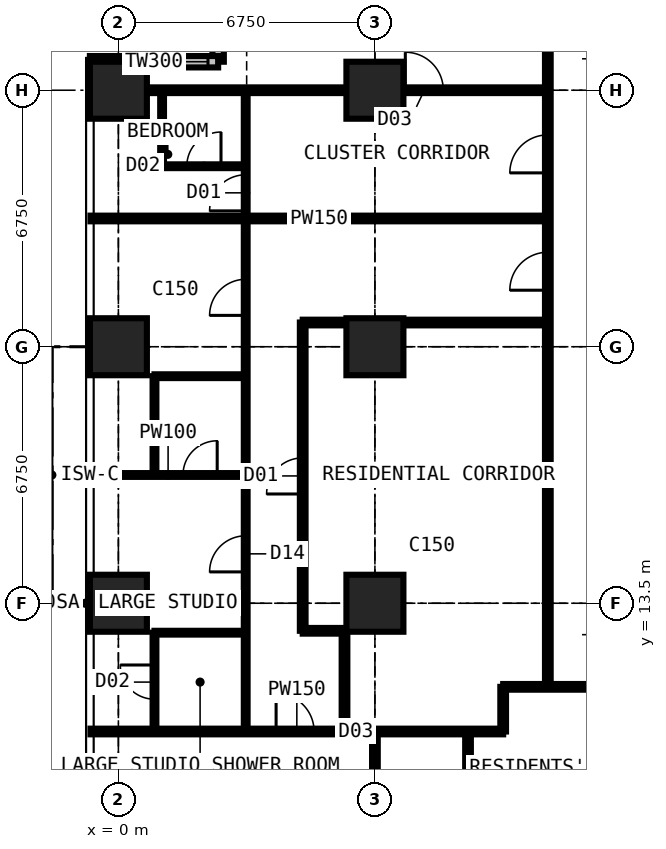
"""IFC4 building model, lengths in metres.
Left out: names, types, materials, properties, quantities, classifications, styles, units other than length and angle.
Written with IfcOpenShell. Run it as: python <this file> out.ifc"""

import sys

from ifc_helpers import new_model, si_unit, direction, frame, frame_2d, origin, origin_2d, place, context, subcontext, project, spatial, rectangle, extrude, element, fill, save


model = new_model("IFC4")
c1 = context("Model", 3, precision=1e-05, world=origin(), true_north=direction((0.0, 1.0)))
c2 = subcontext(c1, "Body", "Model", "MODEL_VIEW")
j1 = project(units=[si_unit("LENGTHUNIT", "METRE"), si_unit("PLANEANGLEUNIT", "RADIAN")], contexts=[c1])
p1 = place(None, origin())
s1 = spatial("IfcSite", under=j1, at=p1, CompositionType="ELEMENT")
p2 = place(p1, origin())
s2 = spatial("IfcBuilding", under=s1, at=p2, CompositionType="ELEMENT")
p3 = place(p2, frame((0.0, 0.0, 153.0)))
s3 = spatial("IfcBuildingStorey", under=s2, at=p3, CompositionType="ELEMENT", Elevation=153.0)
for number, where, z_axis, x_axis in (
    (1, (0.0, 13.5, 0.0), (0.0, 0.0, 1.0), (1.0, 0.0, 0.0)),
    (2, (0.0, 20.25, 0.0), (0.0, 0.0, 1.0), (1.0, 0.0, 0.0)),
    (3, (0.0, 27.0, 0.0), (0.0, 0.0, 1.0), (1.0, 0.0, 0.0)),
    (4, (6.75, 13.5, 0.0), (0.0, 0.0, 1.0), (1.0, 0.0, 0.0)),
    (5, (6.75, 20.25, 0.0), (0.0, 0.0, 1.0), (1.0, 0.0, 0.0)),
    (6, (6.75, 27.0, 0.0), (0.0, 0.0, 1.0), (1.0, 0.0, 0.0)),
):
    element("IfcColumn", number, at=place(p3, frame(where, z_axis=z_axis, x_axis=x_axis)), inside=s3, PredefinedType="COLUMN", context=c2, shape_type="SweptSolid", body=[
        extrude(rectangle(XDim=1.5, YDim=1.5, at=origin_2d()), origin(), (0.0, 0.0, 1.0), 3.6),
    ])
p4 = place(p3, frame((2.625, 31.125, 0.0), z_axis=(0.0, 0.0, 1.0), x_axis=(0.0, -1.0, 0.0)))
e7 = element("IfcWall", 7, at=p4, inside=s3, PredefinedType="SOLIDWALL", context=c2, shape_type="SweptSolid", body=[
    extrude(rectangle(XDim=3.375, YDim=0.3, at=frame_2d((1.688, 0.0))), origin(), (0.0, 0.0, 1.0), 3.375),
])
p5 = place(p4, frame((0.788, 0.0, 0.6)))
e8 = element("IfcOpeningElement", 8, at=p5, cuts=e7, PredefinedType="OPENING", context=c2, shape_type="SweptSolid", body=[
    extrude(rectangle(XDim=1.8, YDim=2.1, at=frame_2d((0.9, 1.05))), frame((0.0, 0.16, 0.0), z_axis=(0.0, -1.0, 0.0), x_axis=(1.0, 0.0, 0.0)), (0.0, 0.0, 1.0), 0.32),
])
p6 = place(p3, frame((2.625, 27.75, 0.0), z_axis=(0.0, 0.0, 1.0), x_axis=(-1.0, 0.0, 0.0)))
e9 = element("IfcWall", 9, at=p6, inside=s3, PredefinedType="SOLIDWALL", context=c2, shape_type="SweptSolid", body=[
    extrude(rectangle(XDim=3.375, YDim=0.3, at=frame_2d((1.688, 0.0))), origin(), (0.0, 0.0, 1.0), 3.375),
])
p7 = place(p6, frame((0.268, 0.0, 0.9)))
e10 = element("IfcOpeningElement", 10, at=p7, cuts=e9, PredefinedType="OPENING", context=c2, shape_type="SweptSolid", body=[
    extrude(rectangle(XDim=1.5, YDim=1.8, at=frame_2d((0.75, 0.9))), frame((0.0, 0.16, 0.0), z_axis=(0.0, -1.0, 0.0), x_axis=(1.0, 0.0, 0.0)), (0.0, 0.0, 1.0), 0.32),
])
p8 = place(p3, frame((-0.734, 10.125, 0.0), z_axis=(0.0, 0.0, 1.0), x_axis=(1.0, 0.0, 0.0)))
e11 = element("IfcWall", 11, at=p8, inside=s3, PredefinedType="PARTITIONING", context=c2, shape_type="SweptSolid", body=[
    extrude(rectangle(XDim=10.859, YDim=0.15, at=frame_2d((5.429, 0.0))), origin(), (0.0, 0.0, 1.0), 3.375),
])
p9 = place(p8, frame((4.884, 0.0, 0.0)))
e12 = element("IfcOpeningElement", 12, at=p9, cuts=e11, PredefinedType="OPENING", context=c2, shape_type="SweptSolid", body=[
    extrude(rectangle(XDim=1.0, YDim=2.2, at=frame_2d((0.5, 1.1))), frame((0.0, 0.085, 0.0), z_axis=(0.0, -1.0, 0.0), x_axis=(1.0, 0.0, 0.0)), (0.0, 0.0, 1.0), 0.17),
])
p10 = place(p3, frame((-0.734, 16.875, 0.0), z_axis=(0.0, 0.0, 1.0), x_axis=(1.0, 0.0, 0.0)))
e13 = element("IfcWall", 13, at=p10, inside=s3, PredefinedType="PARTITIONING", context=c2, shape_type="SweptSolid", body=[
    extrude(rectangle(XDim=4.084, YDim=0.1, at=frame_2d((2.042, 0.0))), origin(), (0.0, 0.0, 1.0), 3.375),
])
p11 = place(p10, frame((2.434, 0.0, 0.0)))
e14 = element("IfcOpeningElement", 14, at=p11, cuts=e13, PredefinedType="OPENING", context=c2, shape_type="SweptSolid", body=[
    extrude(rectangle(XDim=0.9, YDim=2.2, at=frame_2d((0.45, 1.1))), frame((0.0, 0.06, 0.0), z_axis=(0.0, -1.0, 0.0), x_axis=(1.0, 0.0, 0.0)), (0.0, 0.0, 1.0), 0.12),
])
p12 = place(p3, frame((-0.734, 23.625, 0.0), z_axis=(0.0, 0.0, 1.0), x_axis=(1.0, 0.0, 0.0)))
e15 = element("IfcWall", 15, at=p12, inside=s3, PredefinedType="PARTITIONING", context=c2, shape_type="SweptSolid", body=[
    extrude(rectangle(XDim=12.034, YDim=0.15, at=frame_2d((6.017, 0.0))), origin(), (0.0, 0.0, 1.0), 3.375),
])
p13 = place(p3, frame((-0.734, 27.0, 0.0), z_axis=(0.0, 0.0, 1.0), x_axis=(1.0, 0.0, 0.0)))
e16 = element("IfcWall", 16, at=p13, inside=s3, PredefinedType="PARTITIONING", context=c2, shape_type="SweptSolid", body=[
    extrude(rectangle(XDim=12.034, YDim=0.15, at=frame_2d((6.017, 0.0))), origin(), (0.0, 0.0, 1.0), 2.806),
])
p14 = place(p13, frame((8.284, 0.0, 0.0)))
e17 = element("IfcOpeningElement", 17, at=p14, cuts=e16, PredefinedType="OPENING", context=c2, shape_type="SweptSolid", body=[
    extrude(rectangle(XDim=1.0, YDim=2.2, at=frame_2d((0.5, 1.1))), frame((0.0, 0.085, 0.0), z_axis=(0.0, -1.0, 0.0), x_axis=(1.0, 0.0, 0.0)), (0.0, 0.0, 1.0), 0.17),
])
p15 = place(p3, frame((0.95, 10.125, 0.0), z_axis=(0.0, 0.0, 1.0), x_axis=(0.0, 1.0, 0.0)))
e18 = element("IfcWall", 18, at=p15, inside=s3, PredefinedType="PARTITIONING", context=c2, shape_type="SweptSolid", body=[
    extrude(rectangle(XDim=2.6, YDim=0.1, at=frame_2d((1.3, 0.0))), origin(), (0.0, 0.0, 1.0), 3.375),
])
p16 = place(p15, frame((0.85, 0.0, 0.0)))
e19 = element("IfcOpeningElement", 19, at=p16, cuts=e18, PredefinedType="OPENING", context=c2, shape_type="SweptSolid", body=[
    extrude(rectangle(XDim=0.9, YDim=2.2, at=frame_2d((0.45, 1.1))), frame((0.0, 0.06, 0.0), z_axis=(0.0, -1.0, 0.0), x_axis=(1.0, 0.0, 0.0)), (0.0, 0.0, 1.0), 0.12),
])
p17 = place(p3, frame((0.95, 12.725, 0.0), z_axis=(0.0, 0.0, 1.0), x_axis=(1.0, 0.0, 0.0)))
e20 = element("IfcWall", 20, at=p17, inside=s3, PredefinedType="PARTITIONING", context=c2, shape_type="SweptSolid", body=[
    extrude(rectangle(XDim=2.4, YDim=0.1, at=frame_2d((1.2, 0.0))), origin(), (0.0, 0.0, 1.0), 3.375),
])
p18 = place(p3, frame((0.95, 16.875, 0.0), z_axis=(0.0, 0.0, 1.0), x_axis=(0.0, 1.0, 0.0)))
e21 = element("IfcWall", 21, at=p18, inside=s3, PredefinedType="PARTITIONING", context=c2, shape_type="SweptSolid", body=[
    extrude(rectangle(XDim=2.6, YDim=0.1, at=frame_2d((1.3, 0.0))), origin(), (0.0, 0.0, 1.0), 3.375),
])
p19 = place(p3, frame((0.95, 19.475, 0.0), z_axis=(0.0, 0.0, 1.0), x_axis=(1.0, 0.0, 0.0)))
e22 = element("IfcWall", 22, at=p19, inside=s3, PredefinedType="PARTITIONING", context=c2, shape_type="SweptSolid", body=[
    extrude(rectangle(XDim=2.4, YDim=0.1, at=frame_2d((1.2, 0.0))), origin(), (0.0, 0.0, 1.0), 3.375),
])
p20 = place(p3, frame((1.15, 25.0, 0.0), z_axis=(0.0, 0.0, 1.0), x_axis=(0.0, 1.0, 0.0)))
e23 = element("IfcWall", 23, at=p20, inside=s3, PredefinedType="PARTITIONING", context=c2, shape_type="SweptSolid", body=[
    extrude(rectangle(XDim=2.0, YDim=0.1, at=frame_2d((1.0, 0.0))), origin(), (0.0, 0.0, 1.0), 3.375),
])
p21 = place(p3, frame((1.15, 25.0, 0.0), z_axis=(0.0, 0.0, 1.0), x_axis=(1.0, 0.0, 0.0)))
e24 = element("IfcWall", 24, at=p21, inside=s3, PredefinedType="PARTITIONING", context=c2, shape_type="SweptSolid", body=[
    extrude(rectangle(XDim=2.2, YDim=0.1, at=frame_2d((1.1, 0.0))), origin(), (0.0, 0.0, 1.0), 3.375),
])
p22 = place(p21, frame((0.65, 0.0, 0.0)))
e25 = element("IfcOpeningElement", 25, at=p22, cuts=e24, PredefinedType="OPENING", context=c2, shape_type="SweptSolid", body=[
    extrude(rectangle(XDim=0.9, YDim=2.2, at=frame_2d((0.45, 1.1))), frame((0.0, 0.06, 0.0), z_axis=(0.0, -1.0, 0.0), x_axis=(1.0, 0.0, 0.0)), (0.0, 0.0, 1.0), 0.12),
])
p23 = place(p3, frame((3.35, 10.125, 0.0), z_axis=(0.0, 0.0, 1.0), x_axis=(0.0, 1.0, 0.0)))
e26 = element("IfcWall", 26, at=p23, inside=s3, PredefinedType="PARTITIONING", context=c2, shape_type="SweptSolid", body=[
    extrude(rectangle(XDim=16.875, YDim=0.1, at=frame_2d((8.438, 0.0))), origin(), (0.0, 0.0, 1.0), 3.375),
])
p24 = place(p23, frame((13.7, 0.0, 0.0)))
e27 = element("IfcOpeningElement", 27, at=p24, cuts=e26, PredefinedType="OPENING", context=c2, shape_type="SweptSolid", body=[
    extrude(rectangle(XDim=0.95, YDim=2.2, at=frame_2d((0.475, 1.1))), frame((0.0, 0.06, 0.0), z_axis=(0.0, -1.0, 0.0), x_axis=(1.0, 0.0, 0.0)), (0.0, 0.0, 1.0), 0.12),
])
p25 = place(p23, frame((4.2, 0.0, 0.0)))
e28 = element("IfcOpeningElement", 28, at=p25, cuts=e26, PredefinedType="OPENING", context=c2, shape_type="SweptSolid", body=[
    extrude(rectangle(XDim=0.95, YDim=2.2, at=frame_2d((0.475, 1.1))), frame((0.0, 0.06, 0.0), z_axis=(0.0, -1.0, 0.0), x_axis=(1.0, 0.0, 0.0)), (0.0, 0.0, 1.0), 0.12),
])
p26 = place(p23, frame((10.95, 0.0, 0.0)))
e29 = element("IfcOpeningElement", 29, at=p26, cuts=e26, PredefinedType="OPENING", context=c2, shape_type="SweptSolid", body=[
    extrude(rectangle(XDim=0.95, YDim=2.2, at=frame_2d((0.475, 1.1))), frame((0.0, 0.06, 0.0), z_axis=(0.0, -1.0, 0.0), x_axis=(1.0, 0.0, 0.0)), (0.0, 0.0, 1.0), 0.12),
])
p27 = place(p3, frame((4.85, 12.775, 0.0), z_axis=(0.0, 0.0, 1.0), x_axis=(0.0, 1.0, 0.0)))
e30 = element("IfcWall", 30, at=p27, inside=s3, PredefinedType="PARTITIONING", context=c2, shape_type="SweptSolid", body=[
    extrude(rectangle(XDim=8.113, YDim=0.15, at=frame_2d((4.056, 0.0))), origin(), (0.0, 0.0, 1.0), 3.375),
])
p28 = place(p27, frame((3.6, 0.0, 0.0)))
e31 = element("IfcOpeningElement", 31, at=p28, cuts=e30, PredefinedType="OPENING", context=c2, shape_type="SweptSolid", body=[
    extrude(rectangle(XDim=0.95, YDim=2.2, at=frame_2d((0.475, 1.1))), frame((0.0, 0.085, 0.0), z_axis=(0.0, -1.0, 0.0), x_axis=(1.0, 0.0, 0.0)), (0.0, 0.0, 1.0), 0.17),
])
p29 = place(p3, frame((4.85, 12.775, 0.0), z_axis=(0.0, 0.0, 1.0), x_axis=(1.0, 0.0, 0.0)))
e32 = element("IfcWall", 32, at=p29, inside=s3, PredefinedType="PARTITIONING", context=c2, shape_type="SweptSolid", body=[
    extrude(rectangle(XDim=1.1, YDim=0.15, at=frame_2d((0.55, 0.0))), origin(), (0.0, 0.0, 1.0), 3.375),
])
p30 = place(p3, frame((4.85, 20.887, 0.0), z_axis=(0.0, 0.0, 1.0), x_axis=(1.0, 0.0, 0.0)))
e33 = element("IfcWall", 33, at=p30, inside=s3, PredefinedType="PARTITIONING", context=c2, shape_type="SweptSolid", body=[
    extrude(rectangle(XDim=6.45, YDim=0.15, at=frame_2d((3.225, 0.0))), origin(), (0.0, 0.0, 1.0), 3.375),
])
p31 = place(p3, frame((5.95, 10.125, 0.0), z_axis=(0.0, 0.0, 1.0), x_axis=(0.0, 1.0, 0.0)))
e34 = element("IfcWall", 34, at=p31, inside=s3, PredefinedType="PARTITIONING", context=c2, shape_type="SweptSolid", body=[
    extrude(rectangle(XDim=2.65, YDim=0.15, at=frame_2d((1.325, 0.0))), origin(), (0.0, 0.0, 1.0), 3.375),
])
p32 = place(p3, frame((6.75, -0.734, 0.0), z_axis=(0.0, 0.0, 1.0), x_axis=(0.0, 1.0, 0.0)))
e35 = element("IfcWall", 35, at=p32, inside=s3, PredefinedType="PARTITIONING", context=c2, shape_type="SweptSolid", body=[
    extrude(rectangle(XDim=10.859, YDim=0.15, at=frame_2d((5.429, 0.0))), origin(), (0.0, 0.0, 1.0), 2.877),
])
p33 = place(p3, frame((9.2, 4.85, 0.0), z_axis=(0.0, 0.0, 1.0), x_axis=(0.0, 1.0, 0.0)))
e36 = element("IfcWall", 36, at=p33, inside=s3, PredefinedType="PARTITIONING", context=c2, shape_type="SweptSolid", body=[
    extrude(rectangle(XDim=5.275, YDim=0.15, at=frame_2d((2.637, 0.0))), origin(), (0.0, 0.0, 1.0), 3.375),
])
p34 = place(p3, frame((10.125, 10.125, 0.0), z_axis=(0.0, 0.0, 1.0), x_axis=(0.0, 1.0, 0.0)))
e37 = element("IfcWall", 37, at=p34, inside=s3, PredefinedType="PARTITIONING", context=c2, shape_type="SweptSolid", body=[
    extrude(rectangle(XDim=1.175, YDim=0.15, at=frame_2d((0.587, 0.0))), origin(), (0.0, 0.0, 1.0), 3.375),
])
p35 = place(p3, frame((10.125, 11.3, 0.0), z_axis=(0.0, 0.0, 1.0), x_axis=(1.0, 0.0, 0.0)))
e38 = element("IfcWall", 38, at=p35, inside=s3, PredefinedType="PARTITIONING", context=c2, shape_type="SweptSolid", body=[
    extrude(rectangle(XDim=20.25, YDim=0.15, at=frame_2d((10.125, 0.0))), origin(), (0.0, 0.0, 1.0), 3.375),
])
p36 = place(p35, frame((5.2, 0.0, 0.0)))
e39 = element("IfcOpeningElement", 39, at=p36, cuts=e38, PredefinedType="OPENING", context=c2, shape_type="SweptSolid", body=[
    extrude(rectangle(XDim=1.0, YDim=2.2, at=frame_2d((0.5, 1.1))), frame((0.0, 0.085, 0.0), z_axis=(0.0, -1.0, 0.0), x_axis=(1.0, 0.0, 0.0)), (0.0, 0.0, 1.0), 0.17),
])
p37 = place(p35, frame((11.312, 0.0, 0.0)))
e40 = element("IfcOpeningElement", 40, at=p37, cuts=e38, PredefinedType="OPENING", context=c2, shape_type="SweptSolid", body=[
    extrude(rectangle(XDim=1.0, YDim=2.2, at=frame_2d((0.5, 1.1))), frame((0.0, 0.085, 0.0), z_axis=(0.0, -1.0, 0.0), x_axis=(1.0, 0.0, 0.0)), (0.0, 0.0, 1.0), 0.17),
])
p38 = place(p35, frame((2.425, 0.0, 0.0)))
e41 = element("IfcOpeningElement", 41, at=p38, cuts=e38, PredefinedType="OPENING", context=c2, shape_type="SweptSolid", body=[
    extrude(rectangle(XDim=0.95, YDim=2.2, at=frame_2d((0.475, 1.1))), frame((0.0, 0.085, 0.0), z_axis=(0.0, -1.0, 0.0), x_axis=(1.0, 0.0, 0.0)), (0.0, 0.0, 1.0), 0.17),
])
p39 = place(p3, frame((11.3, 11.3, 0.0), z_axis=(0.0, 0.0, 1.0), x_axis=(0.0, 1.0, 0.0)))
e42 = element("IfcWall", 42, at=p39, inside=s3, PredefinedType="PARTITIONING", context=c2, shape_type="SweptSolid", body=[
    extrude(rectangle(XDim=19.3, YDim=0.15, at=frame_2d((9.65, 0.0))), origin(), (0.0, 0.0, 1.0), 3.375),
])
p40 = place(p39, frame((13.525, 0.0, 0.0)))
e43 = element("IfcOpeningElement", 43, at=p40, cuts=e42, PredefinedType="OPENING", context=c2, shape_type="SweptSolid", body=[
    extrude(rectangle(XDim=1.0, YDim=2.2, at=frame_2d((0.5, 1.1))), frame((0.0, 0.085, 0.0), z_axis=(0.0, -1.0, 0.0), x_axis=(1.0, 0.0, 0.0)), (0.0, 0.0, 1.0), 0.17),
])
p41 = place(p39, frame((10.438, 0.0, 0.0)))
e44 = element("IfcOpeningElement", 44, at=p41, cuts=e42, PredefinedType="OPENING", context=c2, shape_type="SweptSolid", body=[
    extrude(rectangle(XDim=1.0, YDim=2.2, at=frame_2d((0.5, 1.1))), frame((0.0, 0.085, 0.0), z_axis=(0.0, -1.0, 0.0), x_axis=(1.0, 0.0, 0.0)), (0.0, 0.0, 1.0), 0.17),
])
p42 = place(p7, origin())
e45 = element("IfcWindow", 45, at=p42, inside=s3, PartitioningType="SINGLE_PANEL", PredefinedType="WINDOW", context=c2, shape_type="SweptSolid", body=[
    extrude(rectangle(XDim=1.5, YDim=1.8, at=frame_2d((0.75, 0.9))), frame((0.0, 0.03, 0.0), z_axis=(0.0, -1.0, 0.0), x_axis=(1.0, 0.0, 0.0)), (0.0, 0.0, 1.0), 0.06),
])
fill(e10, e45)
p43 = place(p9, origin())
e46 = element("IfcDoor", 46, at=p43, inside=s3, OperationType="SINGLE_SWING_LEFT", PredefinedType="DOOR", context=c2, shape_type="SweptSolid", body=[
    extrude(rectangle(XDim=1.0, YDim=2.2, at=frame_2d((0.5, 1.1))), frame((0.0, 0.025, 0.0), z_axis=(0.0, -1.0, 0.0), x_axis=(1.0, 0.0, 0.0)), (0.0, 0.0, 1.0), 0.05),
])
fill(e12, e46)
p44 = place(p14, origin())
e47 = element("IfcDoor", 47, at=p44, inside=s3, OperationType="SINGLE_SWING_LEFT", PredefinedType="DOOR", context=c2, shape_type="SweptSolid", body=[
    extrude(rectangle(XDim=1.0, YDim=2.2, at=frame_2d((0.5, 1.1))), frame((0.0, 0.025, 0.0), z_axis=(0.0, -1.0, 0.0), x_axis=(1.0, 0.0, 0.0)), (0.0, 0.0, 1.0), 0.05),
])
fill(e17, e47)
p45 = place(p24, origin())
e48 = element("IfcDoor", 48, at=p45, inside=s3, OperationType="SINGLE_SWING_LEFT", PredefinedType="DOOR", context=c2, shape_type="SweptSolid", body=[
    extrude(rectangle(XDim=0.95, YDim=2.2, at=frame_2d((0.475, 1.1))), frame((0.0, 0.025, 0.0), z_axis=(0.0, -1.0, 0.0), x_axis=(1.0, 0.0, 0.0)), (0.0, 0.0, 1.0), 0.05),
])
fill(e27, e48)
p46 = place(p22, origin())
e49 = element("IfcDoor", 49, at=p46, inside=s3, OperationType="SINGLE_SWING_RIGHT", PredefinedType="DOOR", context=c2, shape_type="SweptSolid", body=[
    extrude(rectangle(XDim=0.9, YDim=2.2, at=frame_2d((0.45, 1.1))), frame((0.0, 0.025, 0.0), z_axis=(0.0, -1.0, 0.0), x_axis=(1.0, 0.0, 0.0)), (0.0, 0.0, 1.0), 0.05),
])
fill(e25, e49)
p47 = place(p40, origin())
e50 = element("IfcDoor", 50, at=p47, inside=s3, OperationType="SINGLE_SWING_LEFT", PredefinedType="DOOR", context=c2, shape_type="SweptSolid", body=[
    extrude(rectangle(XDim=1.0, YDim=2.2, at=frame_2d((0.5, 1.1))), frame((0.0, 0.025, 0.0), z_axis=(0.0, -1.0, 0.0), x_axis=(1.0, 0.0, 0.0)), (0.0, 0.0, 1.0), 0.05),
])
fill(e43, e50)
p48 = place(p25, origin())
e51 = element("IfcDoor", 51, at=p48, inside=s3, OperationType="SINGLE_SWING_LEFT", PredefinedType="DOOR", context=c2, shape_type="SweptSolid", body=[
    extrude(rectangle(XDim=0.95, YDim=2.2, at=frame_2d((0.475, 1.1))), frame((0.0, 0.025, 0.0), z_axis=(0.0, -1.0, 0.0), x_axis=(1.0, 0.0, 0.0)), (0.0, 0.0, 1.0), 0.05),
])
fill(e28, e51)
p49 = place(p16, origin())
e52 = element("IfcDoor", 52, at=p49, inside=s3, OperationType="SINGLE_SWING_RIGHT", PredefinedType="DOOR", context=c2, shape_type="SweptSolid", body=[
    extrude(rectangle(XDim=0.9, YDim=2.2, at=frame_2d((0.45, 1.1))), frame((0.0, 0.025, 0.0), z_axis=(0.0, -1.0, 0.0), x_axis=(1.0, 0.0, 0.0)), (0.0, 0.0, 1.0), 0.05),
])
fill(e19, e52)
p50 = place(p26, origin())
e53 = element("IfcDoor", 53, at=p50, inside=s3, OperationType="SINGLE_SWING_LEFT", PredefinedType="DOOR", context=c2, shape_type="SweptSolid", body=[
    extrude(rectangle(XDim=0.95, YDim=2.2, at=frame_2d((0.475, 1.1))), frame((0.0, 0.025, 0.0), z_axis=(0.0, -1.0, 0.0), x_axis=(1.0, 0.0, 0.0)), (0.0, 0.0, 1.0), 0.05),
])
fill(e29, e53)
p51 = place(p11, origin())
e54 = element("IfcDoor", 54, at=p51, inside=s3, OperationType="SINGLE_SWING_RIGHT", PredefinedType="DOOR", context=c2, shape_type="SweptSolid", body=[
    extrude(rectangle(XDim=0.9, YDim=2.2, at=frame_2d((0.45, 1.1))), frame((0.0, 0.025, 0.0), z_axis=(0.0, -1.0, 0.0), x_axis=(1.0, 0.0, 0.0)), (0.0, 0.0, 1.0), 0.05),
])
fill(e14, e54)
p52 = place(p41, origin())
e55 = element("IfcDoor", 55, at=p52, inside=s3, OperationType="SINGLE_SWING_LEFT", PredefinedType="DOOR", context=c2, shape_type="SweptSolid", body=[
    extrude(rectangle(XDim=1.0, YDim=2.2, at=frame_2d((0.5, 1.1))), frame((0.0, 0.025, 0.0), z_axis=(0.0, -1.0, 0.0), x_axis=(1.0, 0.0, 0.0)), (0.0, 0.0, 1.0), 0.05),
])
fill(e44, e55)
p53 = place(p28, origin())
e56 = element("IfcDoor", 56, at=p53, inside=s3, OperationType="SINGLE_SWING_LEFT", PredefinedType="DOOR", context=c2, shape_type="SweptSolid", body=[
    extrude(rectangle(XDim=0.95, YDim=2.2, at=frame_2d((0.475, 1.1))), frame((0.0, 0.025, 0.0), z_axis=(0.0, -1.0, 0.0), x_axis=(1.0, 0.0, 0.0)), (0.0, 0.0, 1.0), 0.05),
])
fill(e31, e56)
save(model, sys.argv[1])
